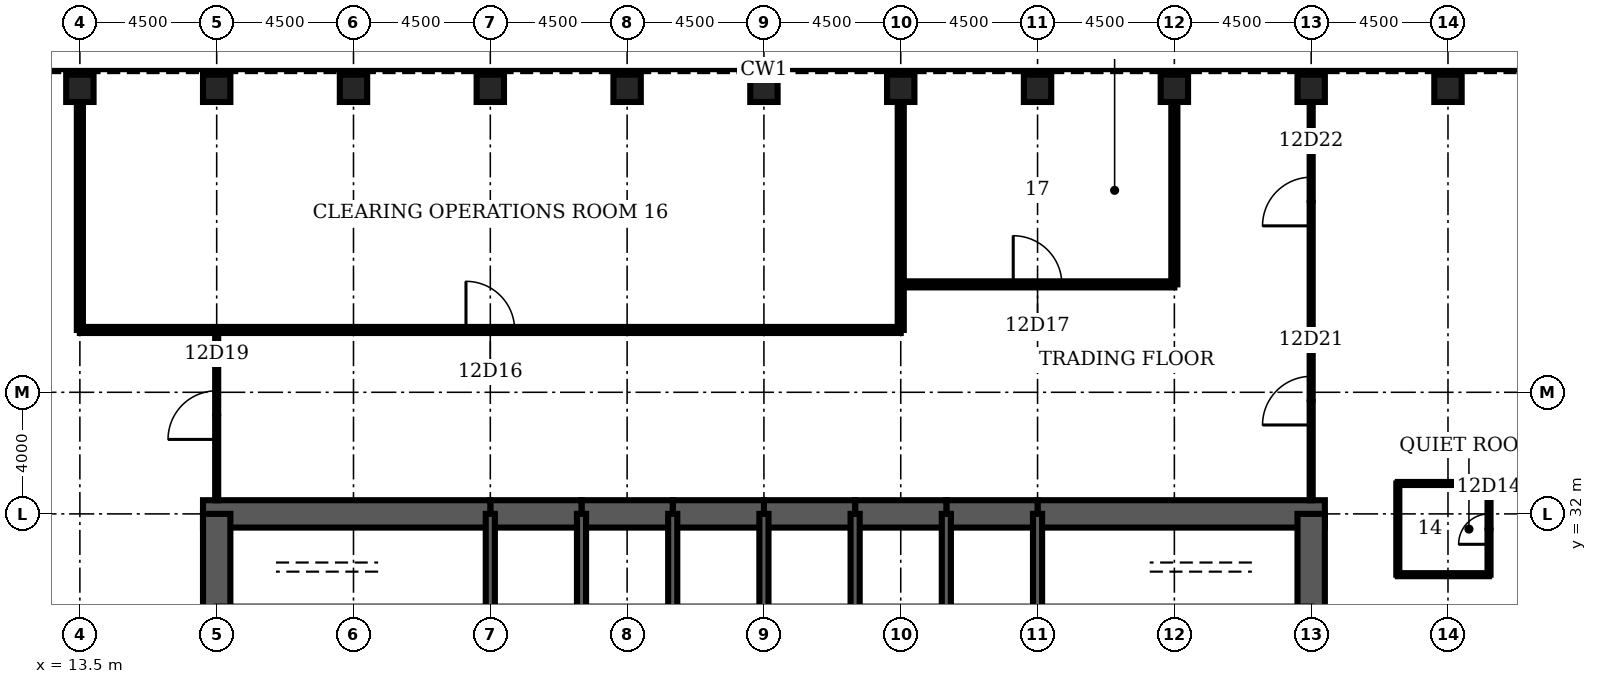
"""IFC4 building model, lengths in metres.
Left out: names, types, materials, properties, quantities, classifications, styles, units other than length and angle.
Written with IfcOpenShell. Run it as: python <this file> out.ifc"""

import sys

from ifc_helpers import new_model, si_unit, direction, frame, frame_2d, origin, origin_2d, place, context, subcontext, project, spatial, rectangle, hollow_rectangle, extrude, element, fill, save


model = new_model("IFC4")
c1 = context("Model", 3, precision=1e-05, world=origin(), true_north=direction((0.0, 1.0)))
c2 = subcontext(c1, "Body", "Model", "MODEL_VIEW")
j1 = project(units=[si_unit("LENGTHUNIT", "METRE"), si_unit("PLANEANGLEUNIT", "RADIAN")], contexts=[c1])
p1 = place(None, origin())
s1 = spatial("IfcSite", under=j1, at=p1, CompositionType="ELEMENT")
p2 = place(p1, origin())
s2 = spatial("IfcBuilding", under=s1, at=p2, CompositionType="ELEMENT")
p3 = place(p2, frame((0.0, 0.0, 59.0)))
s3 = spatial("IfcBuildingStorey", under=s2, at=p3, CompositionType="ELEMENT", Elevation=59.0)
for number, where, z_axis, x_axis in (
    (1, (58.5, 46.0, 0.0), (0.0, 0.0, 1.0), (0.0, 1.0, 0.0)),
    (2, (54.0, 46.0, 0.0), (0.0, 0.0, 1.0), (0.0, 1.0, 0.0)),
    (3, (49.5, 46.0, 0.0), (0.0, 0.0, 1.0), (0.0, 1.0, 0.0)),
    (4, (45.0, 46.0, 0.0), (0.0, 0.0, 1.0), (0.0, 1.0, 0.0)),
    (5, (40.5, 46.0, 0.0), (0.0, 0.0, 1.0), (0.0, 1.0, 0.0)),
    (6, (36.0, 46.0, 0.0), (0.0, 0.0, 1.0), (0.0, 1.0, 0.0)),
    (7, (31.5, 46.0, 0.0), (0.0, 0.0, 1.0), (0.0, 1.0, 0.0)),
    (8, (27.0, 46.0, 0.0), (0.0, 0.0, 1.0), (0.0, 1.0, 0.0)),
    (9, (22.5, 46.0, 0.0), (0.0, 0.0, 1.0), (0.0, 1.0, 0.0)),
    (10, (18.0, 46.0, 0.0), (0.0, 0.0, 1.0), (0.0, 1.0, 0.0)),
    (11, (13.5, 46.0, 0.0), (0.0, 0.0, 1.0), (0.0, 1.0, 0.0)),
):
    element("IfcColumn", number, at=place(p3, frame(where, z_axis=z_axis, x_axis=x_axis)), inside=s3, PredefinedType="COLUMN", context=c2, shape_type="SweptSolid", body=[
        extrude(hollow_rectangle(XDim=0.9, YDim=0.9, WallThickness=0.12, at=origin_2d()), origin(), (0.0, 0.0, 1.0), 4.5),
    ])
p4 = place(p3, frame((54.45, 32.0, 0.0), z_axis=(0.0, 0.0, 1.0), x_axis=(-1.0, 0.0, 0.0)))
e12 = element("IfcWall", 12, at=p4, inside=s3, PredefinedType="SHEAR", context=c2, shape_type="SweptSolid", body=[
    extrude(rectangle(XDim=9.45, YDim=0.9, at=frame_2d((4.725, 0.0))), origin(), (0.0, 0.0, 1.0), 4.5),
])
for number, where, z_axis, x_axis in (
    (13, (45.0, 32.0, 0.0), (0.0, 0.0, 1.0), (-1.0, 0.0, 0.0)),
    (14, (42.0, 32.0, 0.0), (0.0, 0.0, 1.0), (-1.0, 0.0, 0.0)),
    (15, (39.0, 32.0, 0.0), (0.0, 0.0, 1.0), (-1.0, 0.0, 0.0)),
    (16, (36.0, 32.0, 0.0), (0.0, 0.0, 1.0), (-1.0, 0.0, 0.0)),
    (17, (33.0, 32.0, 0.0), (0.0, 0.0, 1.0), (-1.0, 0.0, 0.0)),
    (18, (30.0, 32.0, 0.0), (0.0, 0.0, 1.0), (-1.0, 0.0, 0.0)),
):
    element("IfcWall", number, at=place(p3, frame(where, z_axis=z_axis, x_axis=x_axis)), inside=s3, PredefinedType="SHEAR", context=c2, shape_type="SweptSolid", body=[
        extrude(rectangle(XDim=3.0, YDim=0.9, at=frame_2d((1.5, 0.0))), origin(), (0.0, 0.0, 1.0), 4.5),
    ])
p5 = place(p3, frame((27.0, 32.0, 0.0), z_axis=(0.0, 0.0, 1.0), x_axis=(-1.0, 0.0, 0.0)))
e19 = element("IfcWall", 19, at=p5, inside=s3, PredefinedType="SHEAR", context=c2, shape_type="SweptSolid", body=[
    extrude(rectangle(XDim=9.45, YDim=0.9, at=frame_2d((4.725, 0.0))), origin(), (0.0, 0.0, 1.0), 4.5),
])
for number, where, z_axis, x_axis in (
    (20, (18.0, 32.0, 0.0), (0.0, 0.0, 1.0), (0.0, -1.0, 0.0)),
    (21, (54.0, 28.8, 0.0), (0.0, 0.0, 1.0), (0.0, 1.0, 0.0)),
):
    element("IfcWall", number, at=place(p3, frame(where, z_axis=z_axis, x_axis=x_axis)), inside=s3, PredefinedType="SHEAR", context=c2, shape_type="SweptSolid", body=[
        extrude(rectangle(XDim=3.2, YDim=0.9, at=frame_2d((1.6, 0.0))), origin(), (0.0, 0.0, 1.0), 4.5),
    ])
for number, where, z_axis, x_axis in (
    (22, (27.0, 28.8, 0.0), (0.0, 0.0, 1.0), (0.0, 1.0, 0.0)),
    (23, (30.0, 28.8, 0.0), (0.0, 0.0, 1.0), (0.0, 1.0, 0.0)),
    (24, (33.0, 28.8, 0.0), (0.0, 0.0, 1.0), (0.0, 1.0, 0.0)),
    (25, (36.0, 28.8, 0.0), (0.0, 0.0, 1.0), (0.0, 1.0, 0.0)),
    (26, (39.0, 28.8, 0.0), (0.0, 0.0, 1.0), (0.0, 1.0, 0.0)),
    (27, (42.0, 28.8, 0.0), (0.0, 0.0, 1.0), (0.0, 1.0, 0.0)),
    (28, (45.0, 28.8, 0.0), (0.0, 0.0, 1.0), (0.0, 1.0, 0.0)),
):
    element("IfcWall", number, at=place(p3, frame(where, z_axis=z_axis, x_axis=x_axis)), inside=s3, PredefinedType="SOLIDWALL", context=c2, shape_type="SweptSolid", body=[
        extrude(rectangle(XDim=3.2, YDim=0.3, at=frame_2d((1.6, 0.0))), origin(), (0.0, 0.0, 1.0), 4.5),
    ])
for number, where, z_axis, x_axis in (
    (29, (56.85, 30.0, 0.0), (0.0, 0.0, 1.0), (1.0, 0.0, 0.0)),
    (30, (56.85, 33.0, 0.0), (0.0, 0.0, 1.0), (1.0, 0.0, 0.0)),
):
    element("IfcWall", number, at=place(p3, frame(where, z_axis=z_axis, x_axis=x_axis)), inside=s3, PredefinedType="PARTITIONING", context=c2, shape_type="SweptSolid", body=[
        extrude(rectangle(XDim=3.0, YDim=0.1, at=frame_2d((1.5, 0.0))), origin(), (0.0, 0.0, 1.0), 3.0),
    ])
p6 = place(p3, frame((13.5, 38.05, 0.0), z_axis=(0.0, 0.0, 1.0), x_axis=(1.0, 0.0, 0.0)))
e31 = element("IfcWall", 31, at=p6, inside=s3, PredefinedType="PARTITIONING", context=c2, shape_type="SweptSolid", body=[
    extrude(rectangle(XDim=27.0, YDim=0.2, at=frame_2d((13.5, 0.0))), origin(), (0.0, 0.0, 1.0), 3.0),
])
p7 = place(p6, frame((12.7, 0.0, 0.0)))
e32 = element("IfcOpeningElement", 32, at=p7, cuts=e31, PredefinedType="OPENING", context=c2, shape_type="SweptSolid", body=[
    extrude(rectangle(XDim=1.6, YDim=2.1, at=frame_2d((0.8, 1.05))), frame((0.0, 0.11, 0.0), z_axis=(0.0, -1.0, 0.0), x_axis=(1.0, 0.0, 0.0)), (0.0, 0.0, 1.0), 0.22),
])
p8 = place(p3, frame((40.5, 39.55, 0.0), z_axis=(0.0, 0.0, 1.0), x_axis=(1.0, 0.0, 0.0)))
e33 = element("IfcWall", 33, at=p8, inside=s3, PredefinedType="PARTITIONING", context=c2, shape_type="SweptSolid", body=[
    extrude(rectangle(XDim=9.0, YDim=0.2, at=frame_2d((4.5, 0.0))), origin(), (0.0, 0.0, 1.0), 3.0),
])
p9 = place(p8, frame((3.7, 0.0, 0.0)))
e34 = element("IfcOpeningElement", 34, at=p9, cuts=e33, PredefinedType="OPENING", context=c2, shape_type="SweptSolid", body=[
    extrude(rectangle(XDim=1.6, YDim=2.1, at=frame_2d((0.8, 1.05))), frame((0.0, 0.11, 0.0), z_axis=(0.0, -1.0, 0.0), x_axis=(1.0, 0.0, 0.0)), (0.0, 0.0, 1.0), 0.22),
])
p10 = place(p3, frame((13.5, 38.05, 0.0), z_axis=(0.0, 0.0, 1.0), x_axis=(0.0, 1.0, 0.0)))
e35 = element("IfcWall", 35, at=p10, inside=s3, PredefinedType="PARTITIONING", context=c2, shape_type="SweptSolid", body=[
    extrude(rectangle(XDim=7.5, YDim=0.2, at=frame_2d((3.75, 0.0))), origin(), (0.0, 0.0, 1.0), 3.0),
])
p11 = place(p3, frame((18.0, 32.45, 0.0), z_axis=(0.0, 0.0, 1.0), x_axis=(0.0, 1.0, 0.0)))
e36 = element("IfcWall", 36, at=p11, inside=s3, PredefinedType="PARTITIONING", context=c2, shape_type="SweptSolid", body=[
    extrude(rectangle(XDim=5.6, YDim=0.1, at=frame_2d((2.8, 0.0))), origin(), (0.0, 0.0, 1.0), 3.0),
])
p12 = place(p11, frame((2.0, 0.0, 0.0)))
e37 = element("IfcOpeningElement", 37, at=p12, cuts=e36, PredefinedType="OPENING", context=c2, shape_type="SweptSolid", body=[
    extrude(rectangle(XDim=1.6, YDim=2.1, at=frame_2d((0.8, 1.05))), frame((0.0, 0.06, 0.0), z_axis=(0.0, -1.0, 0.0), x_axis=(1.0, 0.0, 0.0)), (0.0, 0.0, 1.0), 0.12),
])
p13 = place(p3, frame((40.5, 38.05, 0.0), z_axis=(0.0, 0.0, 1.0), x_axis=(0.0, 1.0, 0.0)))
e38 = element("IfcWall", 38, at=p13, inside=s3, PredefinedType="PARTITIONING", context=c2, shape_type="SweptSolid", body=[
    extrude(rectangle(XDim=7.5, YDim=0.2, at=frame_2d((3.75, 0.0))), origin(), (0.0, 0.0, 1.0), 3.0),
])
p14 = place(p3, frame((49.5, 39.55, 0.0), z_axis=(0.0, 0.0, 1.0), x_axis=(0.0, 1.0, 0.0)))
e39 = element("IfcWall", 39, at=p14, inside=s3, PredefinedType="PARTITIONING", context=c2, shape_type="SweptSolid", body=[
    extrude(rectangle(XDim=6.0, YDim=0.2, at=frame_2d((3.0, 0.0))), origin(), (0.0, 0.0, 1.0), 3.0),
])
p15 = place(p3, frame((54.0, 32.45, 0.0), z_axis=(0.0, 0.0, 1.0), x_axis=(0.0, 1.0, 0.0)))
e40 = element("IfcWall", 40, at=p15, inside=s3, PredefinedType="PARTITIONING", context=c2, shape_type="SweptSolid", body=[
    extrude(rectangle(XDim=13.1, YDim=0.1, at=frame_2d((6.55, 0.0))), origin(), (0.0, 0.0, 1.0), 3.0),
])
p16 = place(p15, frame((2.475, 0.0, 0.0)))
e41 = element("IfcOpeningElement", 41, at=p16, cuts=e40, PredefinedType="OPENING", context=c2, shape_type="SweptSolid", body=[
    extrude(rectangle(XDim=1.6, YDim=2.1, at=frame_2d((0.8, 1.05))), frame((0.0, 0.06, 0.0), z_axis=(0.0, -1.0, 0.0), x_axis=(1.0, 0.0, 0.0)), (0.0, 0.0, 1.0), 0.12),
])
p17 = place(p15, frame((9.025, 0.0, 0.0)))
e42 = element("IfcOpeningElement", 42, at=p17, cuts=e40, PredefinedType="OPENING", context=c2, shape_type="SweptSolid", body=[
    extrude(rectangle(XDim=1.6, YDim=2.1, at=frame_2d((0.8, 1.05))), frame((0.0, 0.06, 0.0), z_axis=(0.0, -1.0, 0.0), x_axis=(1.0, 0.0, 0.0)), (0.0, 0.0, 1.0), 0.12),
])
p18 = place(p3, frame((56.85, 30.0, 0.0), z_axis=(0.0, 0.0, 1.0), x_axis=(0.0, 1.0, 0.0)))
e43 = element("IfcWall", 43, at=p18, inside=s3, PredefinedType="PARTITIONING", context=c2, shape_type="SweptSolid", body=[
    extrude(rectangle(XDim=3.0, YDim=0.1, at=frame_2d((1.5, 0.0))), origin(), (0.0, 0.0, 1.0), 3.0),
])
p19 = place(p3, frame((59.85, 30.0, 0.0), z_axis=(0.0, 0.0, 1.0), x_axis=(0.0, 1.0, 0.0)))
e44 = element("IfcWall", 44, at=p19, inside=s3, PredefinedType="PARTITIONING", context=c2, shape_type="SweptSolid", body=[
    extrude(rectangle(XDim=3.0, YDim=0.1, at=frame_2d((1.5, 0.0))), origin(), (0.0, 0.0, 1.0), 3.0),
])
p20 = place(p19, frame((1.0, 0.0, 0.0)))
e45 = element("IfcOpeningElement", 45, at=p20, cuts=e44, PredefinedType="OPENING", context=c2, shape_type="SweptSolid", body=[
    extrude(rectangle(XDim=1.0, YDim=2.1, at=frame_2d((0.5, 1.05))), frame((0.0, 0.06, 0.0), z_axis=(0.0, -1.0, 0.0), x_axis=(1.0, 0.0, 0.0)), (0.0, 0.0, 1.0), 0.12),
])
p21 = place(p20, origin())
e46 = element("IfcDoor", 46, at=p21, inside=s3, OperationType="SINGLE_SWING_LEFT", PredefinedType="DOOR", context=c2, shape_type="SweptSolid", body=[
    extrude(rectangle(XDim=1.0, YDim=2.1, at=frame_2d((0.5, 1.05))), frame((0.0, 0.025, 0.0), z_axis=(0.0, -1.0, 0.0), x_axis=(1.0, 0.0, 0.0)), (0.0, 0.0, 1.0), 0.05),
])
fill(e45, e46)
p22 = place(p7, origin())
e47 = element("IfcDoor", 47, at=p22, inside=s3, OperationType="SINGLE_SWING_LEFT", PredefinedType="DOOR", context=c2, shape_type="SweptSolid", body=[
    extrude(rectangle(XDim=1.6, YDim=2.1, at=frame_2d((0.8, 1.05))), frame((0.0, 0.025, 0.0), z_axis=(0.0, -1.0, 0.0), x_axis=(1.0, 0.0, 0.0)), (0.0, 0.0, 1.0), 0.05),
])
fill(e32, e47)
p23 = place(p9, origin())
e48 = element("IfcDoor", 48, at=p23, inside=s3, OperationType="SINGLE_SWING_LEFT", PredefinedType="DOOR", context=c2, shape_type="SweptSolid", body=[
    extrude(rectangle(XDim=1.6, YDim=2.1, at=frame_2d((0.8, 1.05))), frame((0.0, 0.025, 0.0), z_axis=(0.0, -1.0, 0.0), x_axis=(1.0, 0.0, 0.0)), (0.0, 0.0, 1.0), 0.05),
])
fill(e34, e48)
p24 = place(p12, origin())
e49 = element("IfcDoor", 49, at=p24, inside=s3, OperationType="SINGLE_SWING_LEFT", PredefinedType="DOOR", context=c2, shape_type="SweptSolid", body=[
    extrude(rectangle(XDim=1.6, YDim=2.1, at=frame_2d((0.8, 1.05))), frame((0.0, 0.025, 0.0), z_axis=(0.0, -1.0, 0.0), x_axis=(1.0, 0.0, 0.0)), (0.0, 0.0, 1.0), 0.05),
])
fill(e37, e49)
p25 = place(p16, origin())
e50 = element("IfcDoor", 50, at=p25, inside=s3, OperationType="SINGLE_SWING_LEFT", PredefinedType="DOOR", context=c2, shape_type="SweptSolid", body=[
    extrude(rectangle(XDim=1.6, YDim=2.1, at=frame_2d((0.8, 1.05))), frame((0.0, 0.025, 0.0), z_axis=(0.0, -1.0, 0.0), x_axis=(1.0, 0.0, 0.0)), (0.0, 0.0, 1.0), 0.05),
])
fill(e41, e50)
p26 = place(p17, origin())
e51 = element("IfcDoor", 51, at=p26, inside=s3, OperationType="SINGLE_SWING_LEFT", PredefinedType="DOOR", context=c2, shape_type="SweptSolid", body=[
    extrude(rectangle(XDim=1.6, YDim=2.1, at=frame_2d((0.8, 1.05))), frame((0.0, 0.025, 0.0), z_axis=(0.0, -1.0, 0.0), x_axis=(1.0, 0.0, 0.0)), (0.0, 0.0, 1.0), 0.05),
])
fill(e42, e51)
save(model, sys.argv[1])
